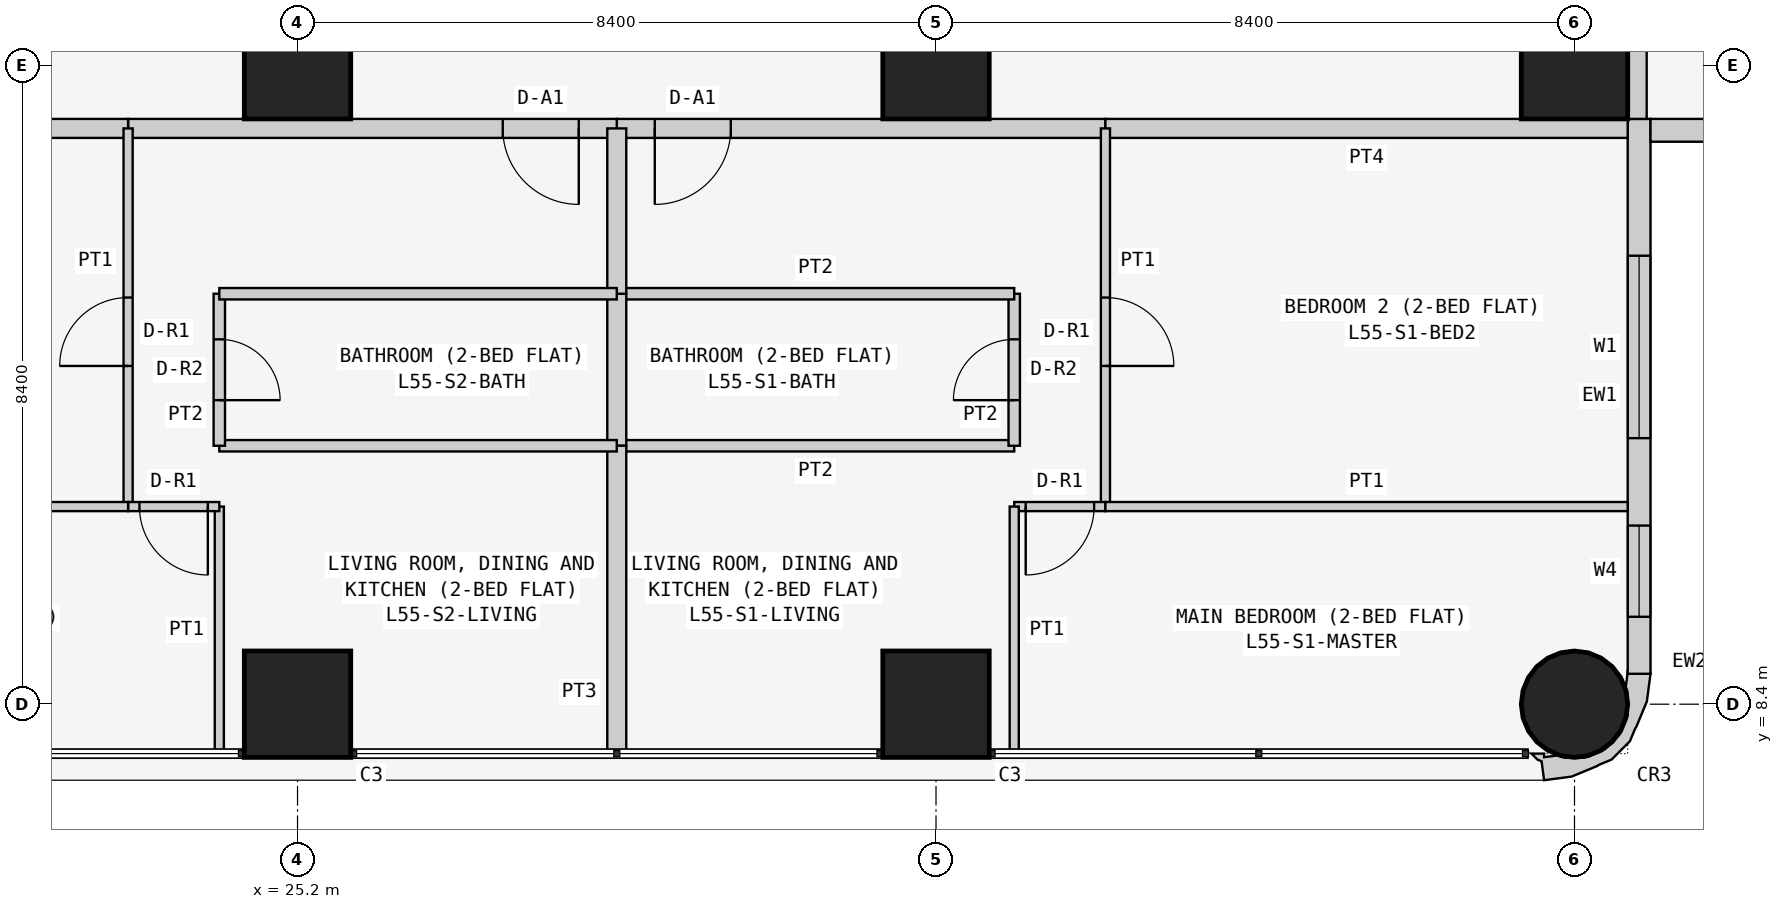
"""IFC4 building model, lengths in metres.
Left out: names, types, materials, properties, quantities, classifications, styles, units other than length and angle.
Written with IfcOpenShell. Run it as: python <this file> out.ifc"""

import sys

from ifc_helpers import new_model, si_unit, direction, frame, frame_2d, origin, origin_2d, place, context, subcontext, project, spatial, polyline, rectangle, circle, outline, extrude, element, fill, save


model = new_model("IFC4")
c1 = context("Model", 3, precision=1e-05, world=origin(), true_north=direction((0.0, 1.0)))
c2 = subcontext(c1, "Body", "Model", "MODEL_VIEW")
j1 = project(units=[si_unit("LENGTHUNIT", "METRE"), si_unit("PLANEANGLEUNIT", "RADIAN")], contexts=[c1])
p1 = place(None, origin())
s1 = spatial("IfcSite", under=j1, at=p1, CompositionType="ELEMENT")
p2 = place(p1, origin())
s2 = spatial("IfcBuilding", under=s1, at=p2, CompositionType="ELEMENT")
p3 = place(p2, frame((0.0, 0.0, 212.1)))
s3 = spatial("IfcBuildingStorey", under=s2, at=p3, CompositionType="ELEMENT", Elevation=212.1)
for number, where, z_axis, x_axis in (
    (1, (25.2, 8.4, 0.0), (0.0, 0.0, 1.0), (1.0, 0.0, 0.0)),
    (2, (25.2, 16.8, 0.0), (0.0, 0.0, 1.0), (1.0, 0.0, 0.0)),
    (3, (33.6, 8.4, 0.0), (0.0, 0.0, 1.0), (1.0, 0.0, 0.0)),
    (4, (33.6, 16.8, 0.0), (0.0, 0.0, 1.0), (1.0, 0.0, 0.0)),
):
    element("IfcColumn", number, at=place(p3, frame(where, z_axis=z_axis, x_axis=x_axis)), inside=s3, PredefinedType="COLUMN", context=c2, shape_type="SweptSolid", body=[
        extrude(rectangle(XDim=1.4, YDim=1.4, at=origin_2d()), origin(), (0.0, 0.0, 1.0), 3.6),
    ])
p4 = place(p3, frame((42.0, 8.4, 0.0), z_axis=(0.0, 0.0, 1.0), x_axis=(1.0, 0.0, 0.0)))
e5 = element("IfcColumn", 5, at=p4, inside=s3, PredefinedType="COLUMN", context=c2, shape_type="SweptSolid", body=[
    extrude(circle(Radius=0.7, at=origin_2d()), origin(), (0.0, 0.0, 1.0), 3.6),
])
p5 = place(p3, frame((42.0, 16.8, 0.0), z_axis=(0.0, 0.0, 1.0), x_axis=(1.0, 0.0, 0.0)))
e6 = element("IfcColumn", 6, at=p5, inside=s3, PredefinedType="COLUMN", context=c2, shape_type="SweptSolid", body=[
    extrude(rectangle(XDim=1.4, YDim=1.4, at=origin_2d()), origin(), (0.0, 0.0, 1.0), 3.6),
])
p6 = place(p3, frame((42.85, 8.8, 0.0), z_axis=(0.0, 0.0, 1.0), x_axis=(0.0, 1.0, 0.0)))
e7 = element("IfcWall", 7, at=p6, inside=s3, PredefinedType="SOLIDWALL", context=c2, shape_type="SweptSolid", body=[
    extrude(rectangle(XDim=7.3, YDim=0.3, at=frame_2d((3.65, 0.0))), origin(), (0.0, 0.0, 1.0), 3.45),
])
p7 = place(p6, frame((3.1, 0.0, 0.9)))
e8 = element("IfcOpeningElement", 8, at=p7, cuts=e7, PredefinedType="OPENING", context=c2, shape_type="SweptSolid", body=[
    extrude(rectangle(XDim=2.4, YDim=1.5, at=frame_2d((1.2, 0.75))), frame((0.0, 0.16, 0.0), z_axis=(0.0, -1.0, 0.0), x_axis=(1.0, 0.0, 0.0)), (0.0, 0.0, 1.0), 0.32),
])
p8 = place(p6, frame((0.75, 0.0, 0.9)))
e9 = element("IfcOpeningElement", 9, at=p8, cuts=e7, PredefinedType="OPENING", context=c2, shape_type="SweptSolid", body=[
    extrude(rectangle(XDim=1.2, YDim=1.5, at=frame_2d((0.6, 0.75))), frame((0.0, 0.16, 0.0), z_axis=(0.0, -1.0, 0.0), x_axis=(1.0, 0.0, 0.0)), (0.0, 0.0, 1.0), 0.32),
])
p9 = place(p3, frame((43.0, 15.95, 0.0), z_axis=(0.0, 0.0, 1.0), x_axis=(1.0, 0.0, 0.0)))
e10 = element("IfcWall", 10, at=p9, inside=s3, PredefinedType="SOLIDWALL", context=c2, shape_type="SweptSolid", body=[
    extrude(rectangle(XDim=7.0, YDim=0.3, at=frame_2d((3.5, 0.0))), origin(), (0.0, 0.0, 1.0), 3.45),
])
p10 = place(p9, frame((1.5, 0.0, 0.9)))
e11 = element("IfcOpeningElement", 11, at=p10, cuts=e10, PredefinedType="OPENING", context=c2, shape_type="SweptSolid", body=[
    extrude(rectangle(XDim=2.4, YDim=1.5, at=frame_2d((1.2, 0.75))), frame((0.0, 0.16, 0.0), z_axis=(0.0, -1.0, 0.0), x_axis=(1.0, 0.0, 0.0)), (0.0, 0.0, 1.0), 0.32),
])
p11 = place(p9, frame((5.05, 0.0, 0.9)))
e12 = element("IfcOpeningElement", 12, at=p11, cuts=e10, PredefinedType="OPENING", context=c2, shape_type="SweptSolid", body=[
    extrude(rectangle(XDim=1.2, YDim=1.5, at=frame_2d((0.6, 0.75))), frame((0.0, 0.16, 0.0), z_axis=(0.0, -1.0, 0.0), x_axis=(1.0, 0.0, 0.0)), (0.0, 0.0, 1.0), 0.32),
])
p12 = place(p3, frame((41.488, 7.812, 0.0), z_axis=(0.0, 0.0, 1.0), x_axis=(0.439933741929, -0.898030234854, 0.0)))
e13 = element("IfcWall", 13, at=p12, inside=s3, PredefinedType="SOLIDWALL", context=c2, shape_type="SweptSolid", body=[
    extrude(outline(polyline([(-0.222, 1.793), (-0.39, 1.541), (-0.372, 1.532), (-0.195, 1.414), (-0.12, 1.41), (0.131, 1.287), (0.315, 1.078), (0.406, 0.814), (0.388, 0.536), (0.265, 0.285), (0.209, 0.235), (0.148, 0.053), (0.105, 0.074), (0.032, -0.076), (0.138, -0.04), (0.182, -0.0), (0.419, -0.08), (0.536, 0.266), (0.559, 0.631), (0.555, 0.651), (0.566, 0.836), (0.455, 1.159), (0.333, 1.298), (0.324, 1.317), (0.082, 1.591), (-0.222, 1.793)])), origin(), (0.0, 0.0, 1.0), 3.45),
])
p13 = place(p3, frame((42.825, 22.971, 0.0), z_axis=(0.0, 0.0, 1.0), x_axis=(0.0, -1.0, 0.0)))
e14 = element("IfcWall", 14, at=p13, inside=s3, PredefinedType="PARTITIONING", context=c2, shape_type="SweptSolid", body=[
    extrude(rectangle(XDim=6.871, YDim=0.25, at=frame_2d((3.436, 0.0))), origin(), (0.0, 0.0, 1.0), 3.45),
])
p14 = place(p3, frame((35.829, 15.975, 0.0), z_axis=(0.0, 0.0, 1.0), x_axis=(-1.0, 0.0, 0.0)))
e15 = element("IfcWall", 15, at=p14, inside=s3, PredefinedType="PARTITIONING", context=c2, shape_type="SweptSolid", body=[
    extrude(rectangle(XDim=6.429, YDim=0.25, at=frame_2d((3.215, 0.0))), origin(), (0.0, 0.0, 1.0), 3.45),
])
p15 = place(p14, frame((4.929, 0.0, 0.0)))
e16 = element("IfcOpeningElement", 16, at=p15, cuts=e15, PredefinedType="OPENING", context=c2, shape_type="SweptSolid", body=[
    extrude(rectangle(XDim=1.0, YDim=2.1, at=frame_2d((0.5, 1.05))), frame((0.0, 0.135, 0.0), z_axis=(0.0, -1.0, 0.0), x_axis=(1.0, 0.0, 0.0)), (0.0, 0.0, 1.0), 0.27),
])
p16 = place(p3, frame((42.7, 15.975, 0.0), z_axis=(0.0, 0.0, 1.0), x_axis=(-1.0, 0.0, 0.0)))
e17 = element("IfcWall", 17, at=p16, inside=s3, PredefinedType="PARTITIONING", context=c2, shape_type="SweptSolid", body=[
    extrude(rectangle(XDim=6.871, YDim=0.25, at=frame_2d((3.436, 0.0))), origin(), (0.0, 0.0, 1.0), 3.45),
])
p17 = place(p3, frame((29.4, 15.975, 0.0), z_axis=(0.0, 0.0, 1.0), x_axis=(-1.0, 0.0, 0.0)))
e18 = element("IfcWall", 18, at=p17, inside=s3, PredefinedType="PARTITIONING", context=c2, shape_type="SweptSolid", body=[
    extrude(rectangle(XDim=6.429, YDim=0.25, at=frame_2d((3.214, 0.0))), origin(), (0.0, 0.0, 1.0), 3.45),
])
p18 = place(p17, frame((0.5, 0.0, 0.0)))
e19 = element("IfcOpeningElement", 19, at=p18, cuts=e18, PredefinedType="OPENING", context=c2, shape_type="SweptSolid", body=[
    extrude(rectangle(XDim=1.0, YDim=2.1, at=frame_2d((0.5, 1.05))), frame((0.0, 0.135, 0.0), z_axis=(0.0, -1.0, 0.0), x_axis=(1.0, 0.0, 0.0)), (0.0, 0.0, 1.0), 0.27),
])
p19 = place(p3, frame((22.971, 15.975, 0.0), z_axis=(0.0, 0.0, 1.0), x_axis=(-1.0, 0.0, 0.0)))
e20 = element("IfcWall", 20, at=p19, inside=s3, PredefinedType="PARTITIONING", context=c2, shape_type="SweptSolid", body=[
    extrude(rectangle(XDim=6.871, YDim=0.25, at=frame_2d((3.436, 0.0))), origin(), (0.0, 0.0, 1.0), 3.45),
])
p20 = place(p3, frame((29.4, 11.8, 0.0), z_axis=(0.0, 0.0, 1.0), x_axis=(1.0, 0.0, 0.0)))
e21 = element("IfcWall", 21, at=p20, inside=s3, PredefinedType="PARTITIONING", context=c2, shape_type="SweptSolid", body=[
    extrude(rectangle(XDim=5.229, YDim=0.15, at=frame_2d((2.615, 0.0))), origin(), (0.0, 0.0, 1.0), 3.45),
])
p21 = place(p3, frame((34.629, 11.8, 0.0), z_axis=(0.0, 0.0, 1.0), x_axis=(0.0, 1.0, 0.0)))
e22 = element("IfcWall", 22, at=p21, inside=s3, PredefinedType="PARTITIONING", context=c2, shape_type="SweptSolid", body=[
    extrude(rectangle(XDim=2.0, YDim=0.15, at=frame_2d((1.0, 0.0))), origin(), (0.0, 0.0, 1.0), 3.45),
])
p22 = place(p21, frame((0.6, 0.0, 0.0)))
e23 = element("IfcOpeningElement", 23, at=p22, cuts=e22, PredefinedType="OPENING", context=c2, shape_type="SweptSolid", body=[
    extrude(rectangle(XDim=0.8, YDim=2.1, at=frame_2d((0.4, 1.05))), frame((0.0, 0.085, 0.0), z_axis=(0.0, -1.0, 0.0), x_axis=(1.0, 0.0, 0.0)), (0.0, 0.0, 1.0), 0.17),
])
p23 = place(p3, frame((34.629, 13.8, 0.0), z_axis=(0.0, 0.0, 1.0), x_axis=(-1.0, 0.0, 0.0)))
e24 = element("IfcWall", 24, at=p23, inside=s3, PredefinedType="PARTITIONING", context=c2, shape_type="SweptSolid", body=[
    extrude(rectangle(XDim=5.229, YDim=0.15, at=frame_2d((2.615, 0.0))), origin(), (0.0, 0.0, 1.0), 3.45),
])
p24 = place(p3, frame((29.4, 13.8, 0.0), z_axis=(0.0, 0.0, 1.0), x_axis=(0.0, -1.0, 0.0)))
e25 = element("IfcWall", 25, at=p24, inside=s3, PredefinedType="PARTITIONING", context=c2, shape_type="SweptSolid", body=[
    extrude(rectangle(XDim=2.0, YDim=0.25, at=frame_2d((1.0, 0.0))), origin(), (0.0, 0.0, 1.0), 2.848),
])
p25 = place(p3, frame((35.829, 15.975, 0.0), z_axis=(0.0, 0.0, 1.0), x_axis=(0.0, -1.0, 0.0)))
e26 = element("IfcWall", 26, at=p25, inside=s3, PredefinedType="PARTITIONING", context=c2, shape_type="SweptSolid", body=[
    extrude(rectangle(XDim=4.975, YDim=0.12, at=frame_2d((2.488, 0.0))), origin(), (0.0, 0.0, 1.0), 3.45),
])
p26 = place(p25, frame((2.225, 0.0, 0.0)))
e27 = element("IfcOpeningElement", 27, at=p26, cuts=e26, PredefinedType="OPENING", context=c2, shape_type="SweptSolid", body=[
    extrude(rectangle(XDim=0.9, YDim=2.1, at=frame_2d((0.45, 1.05))), frame((0.0, 0.07, 0.0), z_axis=(0.0, -1.0, 0.0), x_axis=(1.0, 0.0, 0.0)), (0.0, 0.0, 1.0), 0.14),
])
p27 = place(p3, frame((35.829, 11.0, 0.0), z_axis=(0.0, 0.0, 1.0), x_axis=(-1.0, 0.0, 0.0)))
e28 = element("IfcWall", 28, at=p27, inside=s3, PredefinedType="PARTITIONING", context=c2, shape_type="SweptSolid", body=[
    extrude(rectangle(XDim=1.2, YDim=0.12, at=frame_2d((0.6, 0.0))), origin(), (0.0, 0.0, 1.0), 3.45),
])
p28 = place(p27, frame((0.149, 0.0, 0.0)))
e29 = element("IfcOpeningElement", 29, at=p28, cuts=e28, PredefinedType="OPENING", context=c2, shape_type="SweptSolid", body=[
    extrude(rectangle(XDim=0.9, YDim=2.1, at=frame_2d((0.45, 1.05))), frame((0.0, 0.07, 0.0), z_axis=(0.0, -1.0, 0.0), x_axis=(1.0, 0.0, 0.0)), (0.0, 0.0, 1.0), 0.14),
])
p29 = place(p3, frame((34.629, 11.0, 0.0), z_axis=(0.0, 0.0, 1.0), x_axis=(0.0, -1.0, 0.0)))
e30 = element("IfcWall", 30, at=p29, inside=s3, PredefinedType="PARTITIONING", context=c2, shape_type="SweptSolid", body=[
    extrude(rectangle(XDim=3.25, YDim=0.12, at=frame_2d((1.625, 0.0))), origin(), (0.0, 0.0, 1.0), 3.45),
])
p30 = place(p3, frame((29.4, 7.75, 0.0), z_axis=(0.0, 0.0, 1.0), x_axis=(0.0, 1.0, 0.0)))
e31 = element("IfcWall", 31, at=p30, inside=s3, PredefinedType="PARTITIONING", context=c2, shape_type="SweptSolid", body=[
    extrude(rectangle(XDim=4.05, YDim=0.25, at=frame_2d((2.025, 0.0))), origin(), (0.0, 0.0, 1.0), 2.848),
])
p31 = place(p3, frame((29.4, 13.8, 0.0), z_axis=(0.0, 0.0, 1.0), x_axis=(0.0, 1.0, 0.0)))
e32 = element("IfcWall", 32, at=p31, inside=s3, PredefinedType="PARTITIONING", context=c2, shape_type="SweptSolid", body=[
    extrude(rectangle(XDim=2.175, YDim=0.25, at=frame_2d((1.087, 0.0))), origin(), (0.0, 0.0, 1.0), 2.848),
])
p32 = place(p3, frame((35.829, 11.0, 0.0), z_axis=(0.0, 0.0, 1.0), x_axis=(1.0, 0.0, 0.0)))
e33 = element("IfcWall", 33, at=p32, inside=s3, PredefinedType="PARTITIONING", context=c2, shape_type="SweptSolid", body=[
    extrude(rectangle(XDim=6.871, YDim=0.12, at=frame_2d((3.436, 0.0))), origin(), (0.0, 0.0, 1.0), 3.45),
])
p33 = place(p3, frame((29.4, 11.8, 0.0), z_axis=(0.0, 0.0, 1.0), x_axis=(-1.0, 0.0, 0.0)))
e34 = element("IfcWall", 34, at=p33, inside=s3, PredefinedType="PARTITIONING", context=c2, shape_type="SweptSolid", body=[
    extrude(rectangle(XDim=5.229, YDim=0.15, at=frame_2d((2.615, 0.0))), origin(), (0.0, 0.0, 1.0), 3.45),
])
p34 = place(p3, frame((24.171, 11.8, 0.0), z_axis=(0.0, 0.0, 1.0), x_axis=(0.0, 1.0, 0.0)))
e35 = element("IfcWall", 35, at=p34, inside=s3, PredefinedType="PARTITIONING", context=c2, shape_type="SweptSolid", body=[
    extrude(rectangle(XDim=2.0, YDim=0.15, at=frame_2d((1.0, 0.0))), origin(), (0.0, 0.0, 1.0), 3.45),
])
p35 = place(p34, frame((0.6, 0.0, 0.0)))
e36 = element("IfcOpeningElement", 36, at=p35, cuts=e35, PredefinedType="OPENING", context=c2, shape_type="SweptSolid", body=[
    extrude(rectangle(XDim=0.8, YDim=2.1, at=frame_2d((0.4, 1.05))), frame((0.0, 0.085, 0.0), z_axis=(0.0, -1.0, 0.0), x_axis=(1.0, 0.0, 0.0)), (0.0, 0.0, 1.0), 0.17),
])
p36 = place(p3, frame((24.171, 13.8, 0.0), z_axis=(0.0, 0.0, 1.0), x_axis=(1.0, 0.0, 0.0)))
e37 = element("IfcWall", 37, at=p36, inside=s3, PredefinedType="PARTITIONING", context=c2, shape_type="SweptSolid", body=[
    extrude(rectangle(XDim=5.229, YDim=0.15, at=frame_2d((2.615, 0.0))), origin(), (0.0, 0.0, 1.0), 3.45),
])
p37 = place(p3, frame((22.971, 11.0, 0.0), z_axis=(0.0, 0.0, 1.0), x_axis=(0.0, 1.0, 0.0)))
e38 = element("IfcWall", 38, at=p37, inside=s3, PredefinedType="PARTITIONING", context=c2, shape_type="SweptSolid", body=[
    extrude(rectangle(XDim=4.975, YDim=0.12, at=frame_2d((2.488, 0.0))), origin(), (0.0, 0.0, 1.0), 3.45),
])
p38 = place(p37, frame((1.85, 0.0, 0.0)))
e39 = element("IfcOpeningElement", 39, at=p38, cuts=e38, PredefinedType="OPENING", context=c2, shape_type="SweptSolid", body=[
    extrude(rectangle(XDim=0.9, YDim=2.1, at=frame_2d((0.45, 1.05))), frame((0.0, 0.07, 0.0), z_axis=(0.0, -1.0, 0.0), x_axis=(1.0, 0.0, 0.0)), (0.0, 0.0, 1.0), 0.14),
])
p39 = place(p3, frame((24.171, 7.75, 0.0), z_axis=(0.0, 0.0, 1.0), x_axis=(0.0, 1.0, 0.0)))
e40 = element("IfcWall", 40, at=p39, inside=s3, PredefinedType="PARTITIONING", context=c2, shape_type="SweptSolid", body=[
    extrude(rectangle(XDim=3.25, YDim=0.12, at=frame_2d((1.625, 0.0))), origin(), (0.0, 0.0, 1.0), 3.45),
])
p40 = place(p3, frame((24.171, 11.0, 0.0), z_axis=(0.0, 0.0, 1.0), x_axis=(-1.0, 0.0, 0.0)))
e41 = element("IfcWall", 41, at=p40, inside=s3, PredefinedType="PARTITIONING", context=c2, shape_type="SweptSolid", body=[
    extrude(rectangle(XDim=1.2, YDim=0.12, at=frame_2d((0.6, 0.0))), origin(), (0.0, 0.0, 1.0), 3.45),
])
p41 = place(p40, frame((0.151, 0.0, 0.0)))
e42 = element("IfcOpeningElement", 42, at=p41, cuts=e41, PredefinedType="OPENING", context=c2, shape_type="SweptSolid", body=[
    extrude(rectangle(XDim=0.9, YDim=2.1, at=frame_2d((0.45, 1.05))), frame((0.0, 0.07, 0.0), z_axis=(0.0, -1.0, 0.0), x_axis=(1.0, 0.0, 0.0)), (0.0, 0.0, 1.0), 0.14),
])
p42 = place(p3, frame((22.971, 11.0, 0.0), z_axis=(0.0, 0.0, 1.0), x_axis=(-1.0, 0.0, 0.0)))
e43 = element("IfcWall", 43, at=p42, inside=s3, PredefinedType="PARTITIONING", context=c2, shape_type="SweptSolid", body=[
    extrude(rectangle(XDim=6.871, YDim=0.12, at=frame_2d((3.436, 0.0))), origin(), (0.0, 0.0, 1.0), 3.45),
])
p43 = place(p7, origin())
e44 = element("IfcWindow", 44, at=p43, inside=s3, PartitioningType="SINGLE_PANEL", PredefinedType="WINDOW", context=c2, shape_type="SweptSolid", body=[
    extrude(rectangle(XDim=2.4, YDim=1.5, at=frame_2d((1.2, 0.75))), frame((0.0, 0.03, 0.0), z_axis=(0.0, -1.0, 0.0), x_axis=(1.0, 0.0, 0.0)), (0.0, 0.0, 1.0), 0.06),
])
fill(e8, e44)
p44 = place(p8, origin())
e45 = element("IfcWindow", 45, at=p44, inside=s3, PartitioningType="SINGLE_PANEL", PredefinedType="WINDOW", context=c2, shape_type="SweptSolid", body=[
    extrude(rectangle(XDim=1.2, YDim=1.5, at=frame_2d((0.6, 0.75))), frame((0.0, 0.03, 0.0), z_axis=(0.0, -1.0, 0.0), x_axis=(1.0, 0.0, 0.0)), (0.0, 0.0, 1.0), 0.06),
])
fill(e9, e45)
p45 = place(p15, origin())
e46 = element("IfcDoor", 46, at=p45, inside=s3, OperationType="SINGLE_SWING_RIGHT", PredefinedType="DOOR", context=c2, shape_type="SweptSolid", body=[
    extrude(rectangle(XDim=1.0, YDim=2.1, at=frame_2d((0.5, 1.05))), frame((0.0, 0.025, 0.0), z_axis=(0.0, -1.0, 0.0), x_axis=(1.0, 0.0, 0.0)), (0.0, 0.0, 1.0), 0.05),
])
fill(e16, e46)
p46 = place(p22, origin())
e47 = element("IfcDoor", 47, at=p46, inside=s3, OperationType="SINGLE_SWING_LEFT", PredefinedType="DOOR", context=c2, shape_type="SweptSolid", body=[
    extrude(rectangle(XDim=0.8, YDim=2.1, at=frame_2d((0.4, 1.05))), frame((0.0, 0.025, 0.0), z_axis=(0.0, -1.0, 0.0), x_axis=(1.0, 0.0, 0.0)), (0.0, 0.0, 1.0), 0.05),
])
fill(e23, e47)
p47 = place(p26, origin())
e48 = element("IfcDoor", 48, at=p47, inside=s3, OperationType="SINGLE_SWING_RIGHT", PredefinedType="DOOR", context=c2, shape_type="SweptSolid", body=[
    extrude(rectangle(XDim=0.9, YDim=2.1, at=frame_2d((0.45, 1.05))), frame((0.0, 0.025, 0.0), z_axis=(0.0, -1.0, 0.0), x_axis=(1.0, 0.0, 0.0)), (0.0, 0.0, 1.0), 0.05),
])
fill(e27, e48)
p48 = place(p28, origin())
e49 = element("IfcDoor", 49, at=p48, inside=s3, OperationType="SINGLE_SWING_RIGHT", PredefinedType="DOOR", context=c2, shape_type="SweptSolid", body=[
    extrude(rectangle(XDim=0.9, YDim=2.1, at=frame_2d((0.45, 1.05))), frame((0.0, 0.025, 0.0), z_axis=(0.0, -1.0, 0.0), x_axis=(1.0, 0.0, 0.0)), (0.0, 0.0, 1.0), 0.05),
])
fill(e29, e49)
p49 = place(p18, origin())
e50 = element("IfcDoor", 50, at=p49, inside=s3, OperationType="SINGLE_SWING_LEFT", PredefinedType="DOOR", context=c2, shape_type="SweptSolid", body=[
    extrude(rectangle(XDim=1.0, YDim=2.1, at=frame_2d((0.5, 1.05))), frame((0.0, 0.025, 0.0), z_axis=(0.0, -1.0, 0.0), x_axis=(1.0, 0.0, 0.0)), (0.0, 0.0, 1.0), 0.05),
])
fill(e19, e50)
p50 = place(p35, frame((0.8, 0.0, 0.0), z_axis=(0.0, 0.0, 1.0), x_axis=(-1.0, 0.0, 0.0)))
e51 = element("IfcDoor", 51, at=p50, inside=s3, OperationType="SINGLE_SWING_RIGHT", PredefinedType="DOOR", context=c2, shape_type="SweptSolid", body=[
    extrude(rectangle(XDim=0.8, YDim=2.1, at=frame_2d((0.4, 1.05))), frame((0.0, 0.025, 0.0), z_axis=(0.0, -1.0, 0.0), x_axis=(1.0, 0.0, 0.0)), (0.0, 0.0, 1.0), 0.05),
])
fill(e36, e51)
p51 = place(p38, origin())
e52 = element("IfcDoor", 52, at=p51, inside=s3, OperationType="SINGLE_SWING_LEFT", PredefinedType="DOOR", context=c2, shape_type="SweptSolid", body=[
    extrude(rectangle(XDim=0.9, YDim=2.1, at=frame_2d((0.45, 1.05))), frame((0.0, 0.025, 0.0), z_axis=(0.0, -1.0, 0.0), x_axis=(1.0, 0.0, 0.0)), (0.0, 0.0, 1.0), 0.05),
])
fill(e39, e52)
p52 = place(p41, origin())
e53 = element("IfcDoor", 53, at=p52, inside=s3, OperationType="SINGLE_SWING_LEFT", PredefinedType="DOOR", context=c2, shape_type="SweptSolid", body=[
    extrude(rectangle(XDim=0.9, YDim=2.1, at=frame_2d((0.45, 1.05))), frame((0.0, 0.025, 0.0), z_axis=(0.0, -1.0, 0.0), x_axis=(1.0, 0.0, 0.0)), (0.0, 0.0, 1.0), 0.05),
])
fill(e42, e53)
save(model, sys.argv[1])
